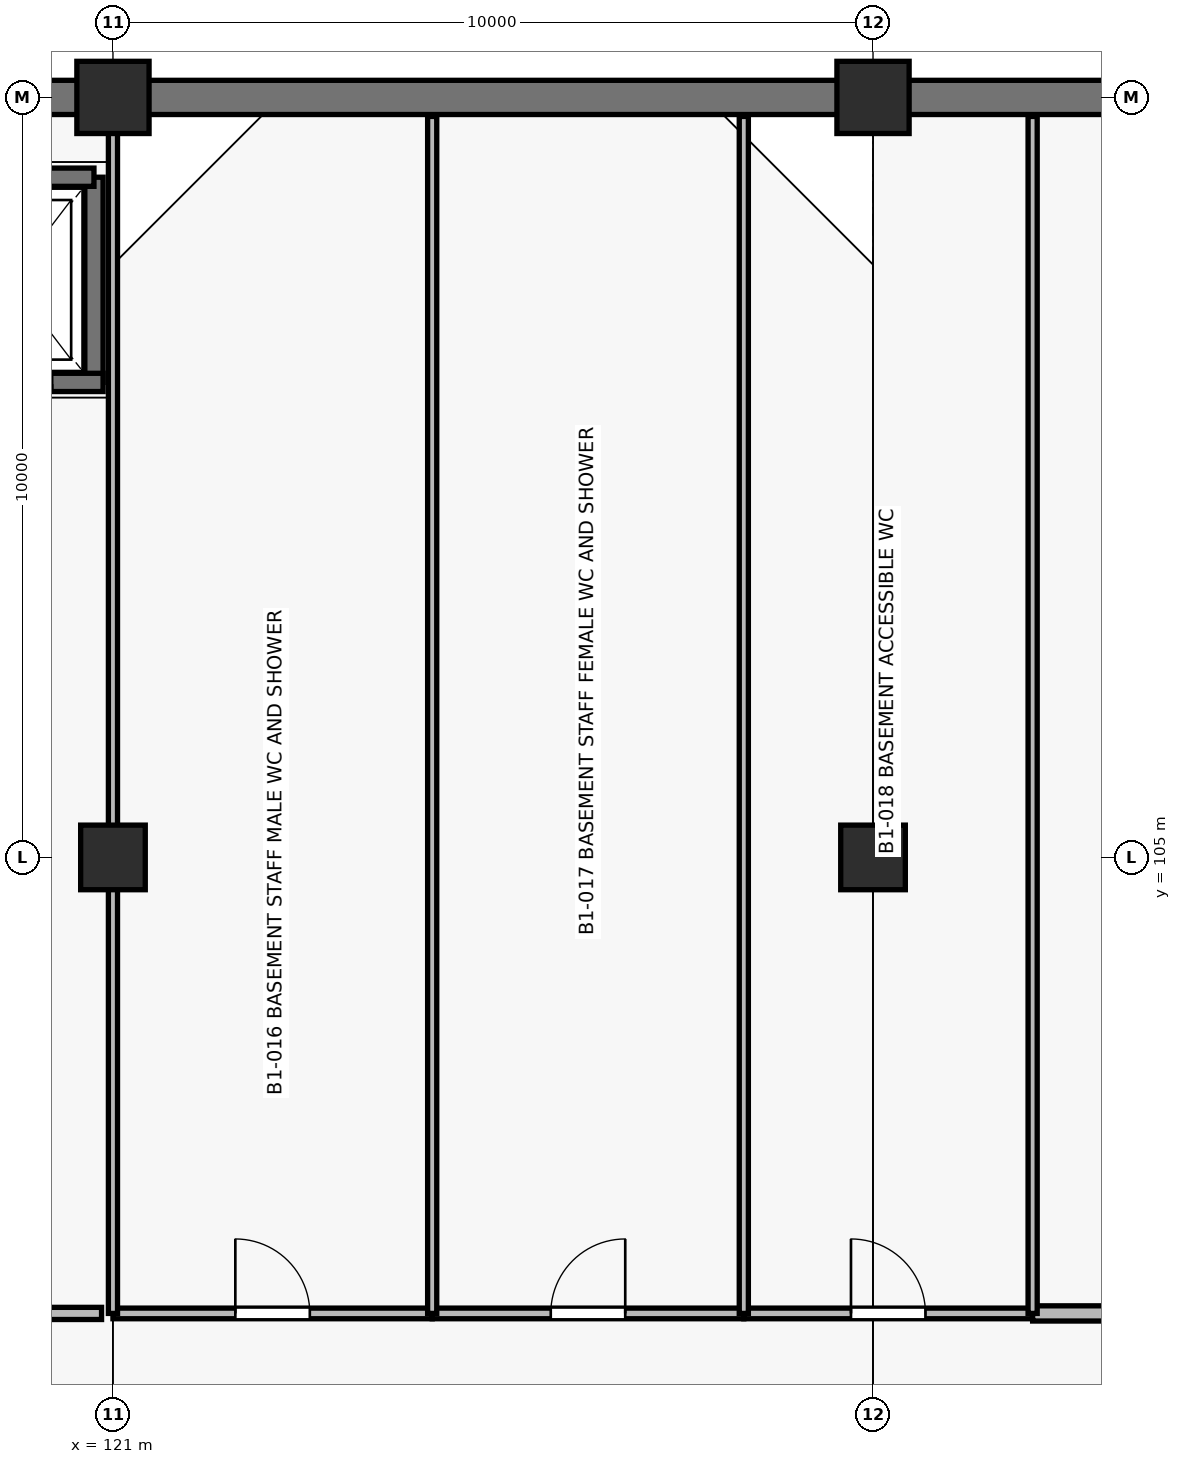
"""IFC4 building model, lengths in metres.
Left out: names, types, materials, properties, quantities, classifications, styles, units other than length and angle.
Written with IfcOpenShell. Run it as: python <this file> out.ifc"""

import sys

from ifc_helpers import new_model, si_unit, direction, frame, frame_2d, origin, origin_2d, place, context, subcontext, project, spatial, rectangle, extrude, element, fill, save


model = new_model("IFC4")
c1 = context("Model", 3, precision=1e-05, world=origin(), true_north=direction((0.0, 1.0)))
c2 = subcontext(c1, "Body", "Model", "MODEL_VIEW")
j1 = project(units=[si_unit("LENGTHUNIT", "METRE"), si_unit("PLANEANGLEUNIT", "RADIAN")], contexts=[c1])
p1 = place(None, origin())
s1 = spatial("IfcSite", under=j1, at=p1, CompositionType="ELEMENT")
p2 = place(p1, origin())
s2 = spatial("IfcBuilding", under=s1, at=p2, CompositionType="ELEMENT")
p3 = place(p2, frame((0.0, 0.0, -4.5)))
s3 = spatial("IfcBuildingStorey", under=s2, at=p3, CompositionType="ELEMENT", Elevation=-4.5)
p4 = place(p3, frame((121.0, 105.0, 0.0), z_axis=(0.0, 0.0, 1.0), x_axis=(1.0, 0.0, 0.0)))
e1 = element("IfcColumn", 1, at=p4, inside=s3, PredefinedType="COLUMN", context=c2, shape_type="SweptSolid", body=[
    extrude(rectangle(XDim=0.85, YDim=0.85, at=origin_2d()), origin(), (0.0, 0.0, 1.0), 4.5),
])
p5 = place(p3, frame((121.0, 115.0, 0.0), z_axis=(0.0, 0.0, 1.0), x_axis=(1.0, 0.0, 0.0)))
e2 = element("IfcColumn", 2, at=p5, inside=s3, PredefinedType="COLUMN", context=c2, shape_type="SweptSolid", body=[
    extrude(rectangle(XDim=0.95, YDim=0.95, at=origin_2d()), origin(), (0.0, 0.0, 1.0), 4.5),
])
p6 = place(p3, frame((131.0, 105.0, 0.0), z_axis=(0.0, 0.0, 1.0), x_axis=(1.0, 0.0, 0.0)))
e3 = element("IfcColumn", 3, at=p6, inside=s3, PredefinedType="COLUMN", context=c2, shape_type="SweptSolid", body=[
    extrude(rectangle(XDim=0.85, YDim=0.85, at=origin_2d()), origin(), (0.0, 0.0, 1.0), 4.5),
])
p7 = place(p3, frame((131.0, 115.0, 0.0), z_axis=(0.0, 0.0, 1.0), x_axis=(1.0, 0.0, 0.0)))
e4 = element("IfcColumn", 4, at=p7, inside=s3, PredefinedType="COLUMN", context=c2, shape_type="SweptSolid", body=[
    extrude(rectangle(XDim=0.95, YDim=0.95, at=origin_2d()), origin(), (0.0, 0.0, 1.0), 4.5),
])
p8 = place(p3, frame((43.0, 115.0, 0.0), z_axis=(0.0, 0.0, 1.0), x_axis=(1.0, 0.0, 0.0)))
e5 = element("IfcWall", 5, at=p8, inside=s3, PredefinedType="SOLIDWALL", context=c2, shape_type="SweptSolid", body=[
    extrude(rectangle(XDim=118.0, YDim=0.45, at=frame_2d((59.0, 0.0))), origin(), (0.0, 0.0, 1.0), 4.5),
])
p9 = place(p3, frame((120.75, 113.95, 0.0), z_axis=(0.0, 0.0, 1.0), x_axis=(0.0, -1.0, 0.0)))
e6 = element("IfcWall", 6, at=p9, inside=s3, PredefinedType="SHEAR", context=c2, shape_type="SweptSolid", body=[
    extrude(rectangle(XDim=2.7, YDim=0.24, at=frame_2d((1.35, 0.0))), origin(), (0.0, 0.0, 1.0), 4.5),
])
p10 = place(p3, frame((118.55, 113.95, 0.0), z_axis=(0.0, 0.0, 1.0), x_axis=(1.0, 0.0, 0.0)))
e7 = element("IfcWall", 7, at=p10, inside=s3, PredefinedType="SHEAR", context=c2, shape_type="SweptSolid", body=[
    extrude(rectangle(XDim=2.2, YDim=0.24, at=frame_2d((1.1, 0.0))), origin(), (0.0, 0.0, 1.0), 4.5),
])
p11 = place(p3, frame((120.87, 111.25, 0.0), z_axis=(0.0, 0.0, 1.0), x_axis=(-1.0, 0.0, 0.0)))
e8 = element("IfcWall", 8, at=p11, inside=s3, PredefinedType="SHEAR", context=c2, shape_type="SweptSolid", body=[
    extrude(rectangle(XDim=2.44, YDim=0.24, at=frame_2d((1.22, 0.0))), origin(), (0.0, 0.0, 1.0), 4.5),
])
p12 = place(p11, frame((0.67, 0.0, 0.0)))
e9 = element("IfcOpeningElement", 9, at=p12, cuts=e8, PredefinedType="OPENING", context=c2, shape_type="SweptSolid", body=[
    extrude(rectangle(XDim=1.1, YDim=2.15, at=frame_2d((0.55, 1.075))), frame((0.0, 0.13, 0.0), z_axis=(0.0, -1.0, 0.0), x_axis=(1.0, 0.0, 0.0)), (0.0, 0.0, 1.0), 0.26),
])
p13 = place(p3, frame((118.35, 99.0, 0.0), z_axis=(0.0, 0.0, 1.0), x_axis=(1.0, 0.0, 0.0)))
e10 = element("IfcWall", 10, at=p13, inside=s3, PredefinedType="PARTITIONING", context=c2, shape_type="SweptSolid", body=[
    extrude(rectangle(XDim=2.5, YDim=0.16, at=frame_2d((1.25, 0.0))), origin(), (0.0, 0.0, 1.0), 3.275),
])
p14 = place(p13, frame((0.45, 0.0, 0.0)))
e11 = element("IfcOpeningElement", 11, at=p14, cuts=e10, PredefinedType="OPENING", context=c2, shape_type="SweptSolid", body=[
    extrude(rectangle(XDim=1.0, YDim=2.15, at=frame_2d((0.5, 1.075))), frame((0.0, 0.09, 0.0), z_axis=(0.0, -1.0, 0.0), x_axis=(1.0, 0.0, 0.0)), (0.0, 0.0, 1.0), 0.18),
])
p15 = place(p3, frame((121.0, 99.0, 0.0), z_axis=(0.0, 0.0, 1.0), x_axis=(1.0, 0.0, 0.0)))
e12 = element("IfcWall", 12, at=p15, inside=s3, PredefinedType="PARTITIONING", context=c2, shape_type="SweptSolid", body=[
    extrude(rectangle(XDim=4.2, YDim=0.14, at=frame_2d((2.1, 0.0))), origin(), (0.0, 0.0, 1.0), 3.275),
])
p16 = place(p15, frame((1.61, 0.0, 0.0)))
e13 = element("IfcOpeningElement", 13, at=p16, cuts=e12, PredefinedType="OPENING", context=c2, shape_type="SweptSolid", body=[
    extrude(rectangle(XDim=0.98, YDim=2.1, at=frame_2d((0.49, 1.05))), frame((0.0, 0.08, 0.0), z_axis=(0.0, -1.0, 0.0), x_axis=(1.0, 0.0, 0.0)), (0.0, 0.0, 1.0), 0.16),
])
p17 = place(p3, frame((121.0, 99.0, 0.0), z_axis=(0.0, 0.0, 1.0), x_axis=(0.0, 1.0, 0.0)))
e14 = element("IfcWall", 14, at=p17, inside=s3, PredefinedType="PARTITIONING", context=c2, shape_type="SweptSolid", body=[
    extrude(rectangle(XDim=15.75, YDim=0.12, at=frame_2d((7.875, 0.0))), origin(), (0.0, 0.0, 1.0), 3.175),
])
p18 = place(p3, frame((125.2, 99.0, 0.0), z_axis=(0.0, 0.0, 1.0), x_axis=(1.0, 0.0, 0.0)))
e15 = element("IfcWall", 15, at=p18, inside=s3, PredefinedType="PARTITIONING", context=c2, shape_type="SweptSolid", body=[
    extrude(rectangle(XDim=4.1, YDim=0.14, at=frame_2d((2.05, 0.0))), origin(), (0.0, 0.0, 1.0), 3.475),
])
p19 = place(p18, frame((1.56, 0.0, 0.0)))
e16 = element("IfcOpeningElement", 16, at=p19, cuts=e15, PredefinedType="OPENING", context=c2, shape_type="SweptSolid", body=[
    extrude(rectangle(XDim=0.98, YDim=2.1, at=frame_2d((0.49, 1.05))), frame((0.0, 0.08, 0.0), z_axis=(0.0, -1.0, 0.0), x_axis=(1.0, 0.0, 0.0)), (0.0, 0.0, 1.0), 0.16),
])
p20 = place(p3, frame((125.2, 99.0, 0.0), z_axis=(0.0, 0.0, 1.0), x_axis=(0.0, 1.0, 0.0)))
e17 = element("IfcWall", 17, at=p20, inside=s3, PredefinedType="PARTITIONING", context=c2, shape_type="SweptSolid", body=[
    extrude(rectangle(XDim=15.75, YDim=0.12, at=frame_2d((7.875, 0.0))), origin(), (0.0, 0.0, 1.0), 3.175),
])
p21 = place(p3, frame((129.3, 99.0, 0.0), z_axis=(0.0, 0.0, 1.0), x_axis=(1.0, 0.0, 0.0)))
e18 = element("IfcWall", 18, at=p21, inside=s3, PredefinedType="PARTITIONING", context=c2, shape_type="SweptSolid", body=[
    extrude(rectangle(XDim=3.8, YDim=0.14, at=frame_2d((1.9, 0.0))), origin(), (0.0, 0.0, 1.0), 3.275),
])
p22 = place(p21, frame((1.41, 0.0, 0.0)))
e19 = element("IfcOpeningElement", 19, at=p22, cuts=e18, PredefinedType="OPENING", context=c2, shape_type="SweptSolid", body=[
    extrude(rectangle(XDim=0.98, YDim=2.1, at=frame_2d((0.49, 1.05))), frame((0.0, 0.08, 0.0), z_axis=(0.0, -1.0, 0.0), x_axis=(1.0, 0.0, 0.0)), (0.0, 0.0, 1.0), 0.16),
])
p23 = place(p3, frame((129.3, 99.0, 0.0), z_axis=(0.0, 0.0, 1.0), x_axis=(0.0, 1.0, 0.0)))
e20 = element("IfcWall", 20, at=p23, inside=s3, PredefinedType="PARTITIONING", context=c2, shape_type="SweptSolid", body=[
    extrude(rectangle(XDim=15.75, YDim=0.12, at=frame_2d((7.875, 0.0))), origin(), (0.0, 0.0, 1.0), 3.175),
])
p24 = place(p3, frame((133.1, 99.0, 0.0), z_axis=(0.0, 0.0, 1.0), x_axis=(1.0, 0.0, 0.0)))
e21 = element("IfcWall", 21, at=p24, inside=s3, PredefinedType="PARTITIONING", context=c2, shape_type="SweptSolid", body=[
    extrude(rectangle(XDim=4.1, YDim=0.2, at=frame_2d((2.05, 0.0))), origin(), (0.0, 0.0, 1.0), 3.275),
])
p25 = place(p24, frame((1.56, 0.0, 0.0)))
e22 = element("IfcOpeningElement", 22, at=p25, cuts=e21, PredefinedType="OPENING", context=c2, shape_type="SweptSolid", body=[
    extrude(rectangle(XDim=1.1, YDim=2.15, at=frame_2d((0.55, 1.075))), frame((0.0, 0.11, 0.0), z_axis=(0.0, -1.0, 0.0), x_axis=(1.0, 0.0, 0.0)), (0.0, 0.0, 1.0), 0.22),
])
p26 = place(p3, frame((133.1, 99.0, 0.0), z_axis=(0.0, 0.0, 1.0), x_axis=(0.0, 1.0, 0.0)))
e23 = element("IfcWall", 23, at=p26, inside=s3, PredefinedType="PARTITIONING", context=c2, shape_type="SweptSolid", body=[
    extrude(rectangle(XDim=15.75, YDim=0.12, at=frame_2d((7.875, 0.0))), origin(), (0.0, 0.0, 1.0), 3.175),
])
p27 = place(p12, origin())
e24 = element("IfcDoor", 24, at=p27, inside=s3, OperationType="DOUBLE_DOOR_SLIDING", PredefinedType="USERDEFINED", context=c2, shape_type="SweptSolid", body=[
    extrude(rectangle(XDim=1.1, YDim=2.15, at=frame_2d((0.55, 1.075))), frame((0.0, 0.025, 0.0), z_axis=(0.0, -1.0, 0.0), x_axis=(1.0, 0.0, 0.0)), (0.0, 0.0, 1.0), 0.05),
])
fill(e9, e24)
p28 = place(p16, origin())
e25 = element("IfcDoor", 25, at=p28, inside=s3, OperationType="SINGLE_SWING_LEFT", PredefinedType="DOOR", context=c2, shape_type="SweptSolid", body=[
    extrude(rectangle(XDim=0.98, YDim=2.1, at=frame_2d((0.49, 1.05))), frame((0.0, 0.025, 0.0), z_axis=(0.0, -1.0, 0.0), x_axis=(1.0, 0.0, 0.0)), (0.0, 0.0, 1.0), 0.05),
])
fill(e13, e25)
p29 = place(p19, origin())
e26 = element("IfcDoor", 26, at=p29, inside=s3, OperationType="SINGLE_SWING_RIGHT", PredefinedType="DOOR", context=c2, shape_type="SweptSolid", body=[
    extrude(rectangle(XDim=0.98, YDim=2.1, at=frame_2d((0.49, 1.05))), frame((0.0, 0.025, 0.0), z_axis=(0.0, -1.0, 0.0), x_axis=(1.0, 0.0, 0.0)), (0.0, 0.0, 1.0), 0.05),
])
fill(e16, e26)
p30 = place(p22, origin())
e27 = element("IfcDoor", 27, at=p30, inside=s3, OperationType="SINGLE_SWING_LEFT", PredefinedType="DOOR", context=c2, shape_type="SweptSolid", body=[
    extrude(rectangle(XDim=0.98, YDim=2.1, at=frame_2d((0.49, 1.05))), frame((0.0, 0.025, 0.0), z_axis=(0.0, -1.0, 0.0), x_axis=(1.0, 0.0, 0.0)), (0.0, 0.0, 1.0), 0.05),
])
fill(e19, e27)
save(model, sys.argv[1])
